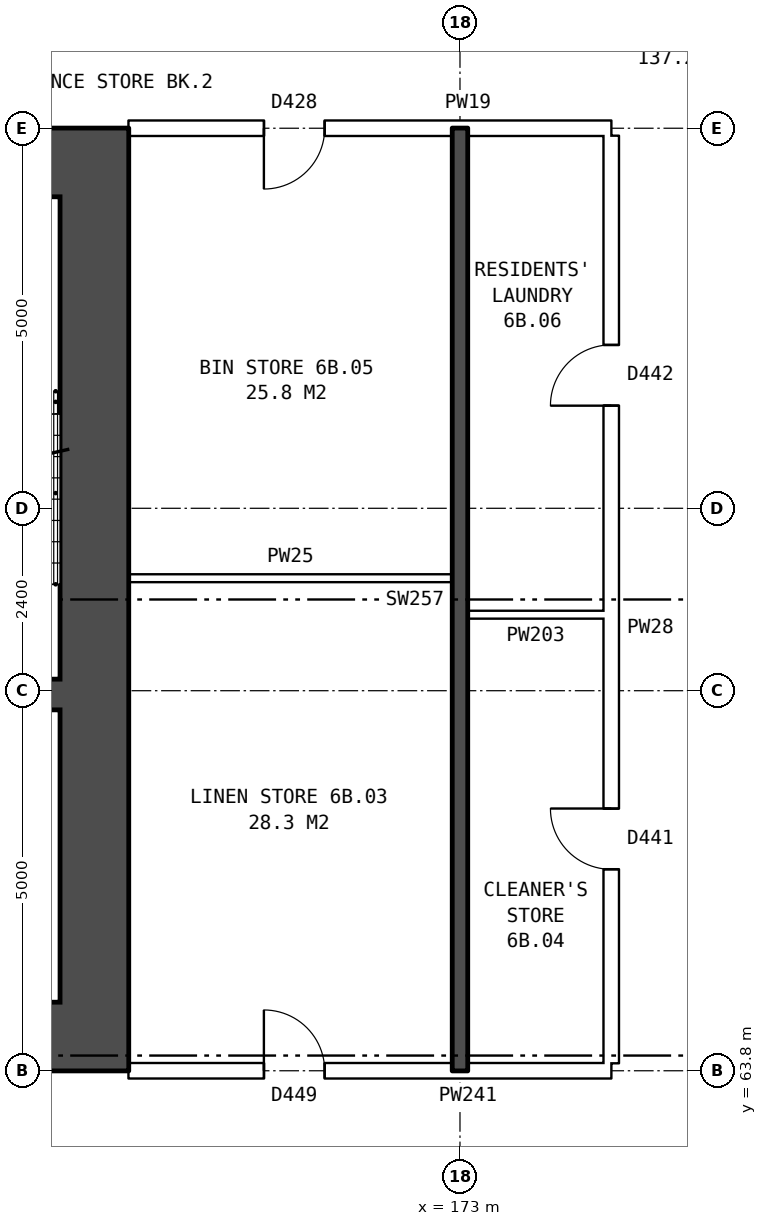
"""IFC4 building model, lengths in metres.
Left out: names, types, materials, properties, quantities, classifications, styles, units other than length and angle.
Written with IfcOpenShell. Run it as: python <this file> out.ifc"""

import sys

from ifc_helpers import new_model, si_unit, direction, frame, frame_2d, origin, place, context, subcontext, project, spatial, rectangle, extrude, element, fill, save


model = new_model("IFC4")
c1 = context("Model", 3, precision=1e-05, world=origin(), true_north=direction((0.0, 1.0)))
c2 = subcontext(c1, "Body", "Model", "MODEL_VIEW")
j1 = project(units=[si_unit("LENGTHUNIT", "METRE"), si_unit("PLANEANGLEUNIT", "RADIAN")], contexts=[c1])
p1 = place(None, origin())
s1 = spatial("IfcSite", under=j1, at=p1, CompositionType="ELEMENT")
p2 = place(p1, origin())
s2 = spatial("IfcBuilding", under=s1, at=p2, CompositionType="ELEMENT")
p3 = place(p2, frame((0.0, 0.0, 25.7)))
s3 = spatial("IfcBuildingStorey", under=s2, at=p3, CompositionType="ELEMENT", Elevation=25.7)
p4 = place(p3, frame((168.19, 75.3, 0.0), z_axis=(0.0, 0.0, 1.0), x_axis=(0.0, -1.0, 0.0)))
e1 = element("IfcWall", 1, at=p4, inside=s3, PredefinedType="SHEAR", context=c2, shape_type="SweptSolid", body=[
    extrude(rectangle(XDim=10.6, YDim=0.9, at=frame_2d((5.3, 0.0))), origin(), (0.0, 0.0, 1.0), 2.85),
])
for number, where, z_axis, x_axis in (
    (2, (160.24, 75.75, 0.0), (0.0, 0.0, 1.0), (1.0, 0.0, 0.0)),
    (3, (160.24, 64.25, 0.0), (0.0, 0.0, 1.0), (1.0, 0.0, 0.0)),
):
    element("IfcWall", number, at=place(p3, frame(where, z_axis=z_axis, x_axis=x_axis)), inside=s3, PredefinedType="SHEAR", context=c2, shape_type="SweptSolid", body=[
        extrude(rectangle(XDim=8.4, YDim=0.9, at=frame_2d((4.2, 0.0))), origin(), (0.0, 0.0, 1.0), 2.85),
    ])
p5 = place(p3, frame((161.14, 68.75, 0.0), z_axis=(0.0, 0.0, 1.0), x_axis=(1.0, 0.0, 0.0)))
e4 = element("IfcWall", 4, at=p5, inside=s3, PredefinedType="SHEAR", context=c2, shape_type="SweptSolid", body=[
    extrude(rectangle(XDim=6.6, YDim=0.4, at=frame_2d((3.3, 0.0))), origin(), (0.0, 0.0, 1.0), 2.85),
])
p6 = place(p5, frame((4.25, 0.0, 0.0)))
e5 = element("IfcOpeningElement", 5, at=p6, cuts=e4, PredefinedType="OPENING", context=c2, shape_type="SweptSolid", body=[
    extrude(rectangle(XDim=1.1, YDim=2.1, at=frame_2d((0.55, 1.05))), frame((0.0, 0.21, 0.0), z_axis=(0.0, -1.0, 0.0), x_axis=(1.0, 0.0, 0.0)), (0.0, 0.0, 1.0), 0.42),
])
p7 = place(p5, frame((2.6, 0.0, 0.0)))
e6 = element("IfcOpeningElement", 6, at=p7, cuts=e4, PredefinedType="OPENING", context=c2, shape_type="SweptSolid", body=[
    extrude(rectangle(XDim=0.85, YDim=2.1, at=frame_2d((0.425, 1.05))), frame((0.0, 0.21, 0.0), z_axis=(0.0, -1.0, 0.0), x_axis=(1.0, 0.0, 0.0)), (0.0, 0.0, 1.0), 0.42),
])
p8 = place(p3, frame((168.64, 63.8, 0.0), z_axis=(0.0, 0.0, 1.0), x_axis=(1.0, 0.0, 0.0)))
e7 = element("IfcWall", 7, at=p8, inside=s3, PredefinedType="PARTITIONING", context=c2, shape_type="SweptSolid", body=[
    extrude(rectangle(XDim=6.35, YDim=0.2, at=frame_2d((3.175, 0.0))), origin(), (0.0, 0.0, 1.0), 2.85),
])
p9 = place(p8, frame((1.78, 0.0, 0.0)))
e8 = element("IfcOpeningElement", 8, at=p9, cuts=e7, PredefinedType="OPENING", context=c2, shape_type="SweptSolid", body=[
    extrude(rectangle(XDim=0.8, YDim=2.1, at=frame_2d((0.4, 1.05))), frame((0.0, 0.11, 0.0), z_axis=(0.0, -1.0, 0.0), x_axis=(1.0, 0.0, 0.0)), (0.0, 0.0, 1.0), 0.22),
])
p10 = place(p3, frame((173.1, 69.8, 0.0), z_axis=(0.0, 0.0, 1.0), x_axis=(1.0, 0.0, 0.0)))
e9 = element("IfcWall", 9, at=p10, inside=s3, PredefinedType="PARTITIONING", context=c2, shape_type="SweptSolid", body=[
    extrude(rectangle(XDim=1.79, YDim=0.1, at=frame_2d((0.895, 0.0))), origin(), (0.0, 0.0, 1.0), 2.85),
])
p11 = place(p3, frame((168.64, 70.28, 0.0), z_axis=(0.0, 0.0, 1.0), x_axis=(1.0, 0.0, 0.0)))
e10 = element("IfcWall", 10, at=p11, inside=s3, PredefinedType="PARTITIONING", context=c2, shape_type="SweptSolid", body=[
    extrude(rectangle(XDim=4.26, YDim=0.1, at=frame_2d((2.13, 0.0))), origin(), (0.0, 0.0, 1.0), 2.85),
])
p12 = place(p3, frame((168.64, 76.2, 0.0), z_axis=(0.0, 0.0, 1.0), x_axis=(1.0, 0.0, 0.0)))
e11 = element("IfcWall", 11, at=p12, inside=s3, PredefinedType="PARTITIONING", context=c2, shape_type="SweptSolid", body=[
    extrude(rectangle(XDim=6.35, YDim=0.2, at=frame_2d((3.175, 0.0))), origin(), (0.0, 0.0, 1.0), 2.85),
])
p13 = place(p12, frame((1.78, 0.0, 0.0)))
e12 = element("IfcOpeningElement", 12, at=p13, cuts=e11, PredefinedType="OPENING", context=c2, shape_type="SweptSolid", body=[
    extrude(rectangle(XDim=0.8, YDim=2.1, at=frame_2d((0.4, 1.05))), frame((0.0, 0.11, 0.0), z_axis=(0.0, -1.0, 0.0), x_axis=(1.0, 0.0, 0.0)), (0.0, 0.0, 1.0), 0.22),
])
p14 = place(p3, frame((173.0, 63.8, 0.0), z_axis=(0.0, 0.0, 1.0), x_axis=(0.0, 1.0, 0.0)))
e13 = element("IfcWall", 13, at=p14, inside=s3, PredefinedType="SOLIDWALL", context=c2, shape_type="SweptSolid", body=[
    extrude(rectangle(XDim=12.4, YDim=0.2, at=frame_2d((6.2, 0.0))), origin(), (0.0, 0.0, 1.0), 2.85),
])
p15 = place(p3, frame((174.99, 63.9, 0.0), z_axis=(0.0, 0.0, 1.0), x_axis=(0.0, 1.0, 0.0)))
e14 = element("IfcWall", 14, at=p15, inside=s3, PredefinedType="PARTITIONING", context=c2, shape_type="SweptSolid", body=[
    extrude(rectangle(XDim=12.2, YDim=0.2, at=frame_2d((6.1, 0.0))), origin(), (0.0, 0.0, 1.0), 2.85),
])
p16 = place(p15, frame((2.55, 0.0, 0.0)))
e15 = element("IfcOpeningElement", 15, at=p16, cuts=e14, PredefinedType="OPENING", context=c2, shape_type="SweptSolid", body=[
    extrude(rectangle(XDim=0.8, YDim=2.1, at=frame_2d((0.4, 1.05))), frame((0.0, 0.11, 0.0), z_axis=(0.0, -1.0, 0.0), x_axis=(1.0, 0.0, 0.0)), (0.0, 0.0, 1.0), 0.22),
])
p17 = place(p15, frame((8.65, 0.0, 0.0)))
e16 = element("IfcOpeningElement", 16, at=p17, cuts=e14, PredefinedType="OPENING", context=c2, shape_type="SweptSolid", body=[
    extrude(rectangle(XDim=0.8, YDim=2.1, at=frame_2d((0.4, 1.05))), frame((0.0, 0.11, 0.0), z_axis=(0.0, -1.0, 0.0), x_axis=(1.0, 0.0, 0.0)), (0.0, 0.0, 1.0), 0.22),
])
p18 = place(p9, origin())
e17 = element("IfcDoor", 17, at=p18, inside=s3, OperationType="SINGLE_SWING_LEFT", PredefinedType="DOOR", context=c2, shape_type="SweptSolid", body=[
    extrude(rectangle(XDim=0.8, YDim=2.1, at=frame_2d((0.4, 1.05))), frame((0.0, 0.025, 0.0), z_axis=(0.0, -1.0, 0.0), x_axis=(1.0, 0.0, 0.0)), (0.0, 0.0, 1.0), 0.05),
])
fill(e8, e17)
p19 = place(p16, origin())
e18 = element("IfcDoor", 18, at=p19, inside=s3, OperationType="SINGLE_SWING_RIGHT", PredefinedType="DOOR", context=c2, shape_type="SweptSolid", body=[
    extrude(rectangle(XDim=0.8, YDim=2.1, at=frame_2d((0.4, 1.05))), frame((0.0, 0.025, 0.0), z_axis=(0.0, -1.0, 0.0), x_axis=(1.0, 0.0, 0.0)), (0.0, 0.0, 1.0), 0.05),
])
fill(e15, e18)
p20 = place(p13, frame((0.8, 0.0, 0.0), z_axis=(0.0, 0.0, 1.0), x_axis=(-1.0, 0.0, 0.0)))
e19 = element("IfcDoor", 19, at=p20, inside=s3, OperationType="SINGLE_SWING_RIGHT", PredefinedType="DOOR", context=c2, shape_type="SweptSolid", body=[
    extrude(rectangle(XDim=0.8, YDim=2.1, at=frame_2d((0.4, 1.05))), frame((0.0, 0.025, 0.0), z_axis=(0.0, -1.0, 0.0), x_axis=(1.0, 0.0, 0.0)), (0.0, 0.0, 1.0), 0.05),
])
fill(e12, e19)
p21 = place(p17, origin())
e20 = element("IfcDoor", 20, at=p21, inside=s3, OperationType="SINGLE_SWING_LEFT", PredefinedType="DOOR", context=c2, shape_type="SweptSolid", body=[
    extrude(rectangle(XDim=0.8, YDim=2.1, at=frame_2d((0.4, 1.05))), frame((0.0, 0.025, 0.0), z_axis=(0.0, -1.0, 0.0), x_axis=(1.0, 0.0, 0.0)), (0.0, 0.0, 1.0), 0.05),
])
fill(e16, e20)
save(model, sys.argv[1])
